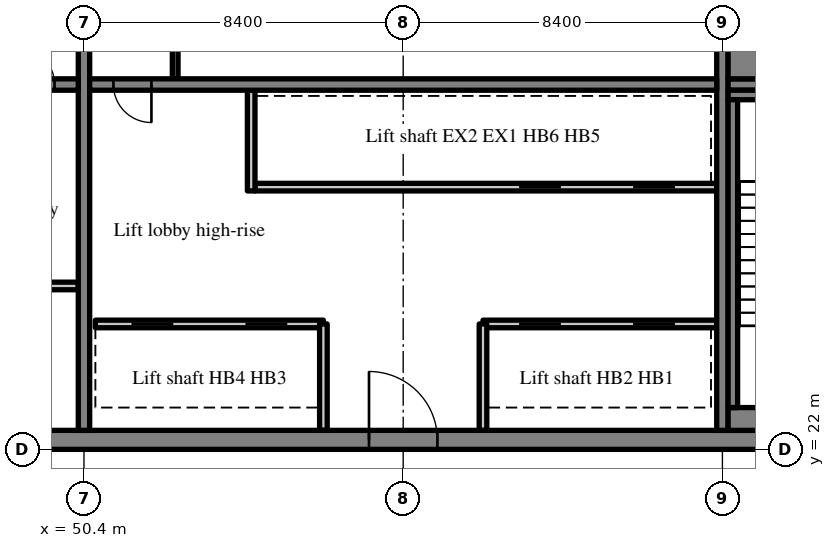
"""IFC4 building model, lengths in metres.
Left out: names, types, materials, properties, quantities, classifications, styles, units other than length and angle.
Written with IfcOpenShell. Run it as: python <this file> out.ifc"""

import sys

from ifc_helpers import new_model, si_unit, direction, frame, frame_2d, origin, place, context, subcontext, project, spatial, rectangle, extrude, source, transform, mapped, element, fill, save


model = new_model("IFC4")
c1 = context("Model", 3, precision=1e-05, world=origin(), true_north=direction((0.0, 1.0)))
c2 = subcontext(c1, "Body", "Model", "MODEL_VIEW")
j1 = project(units=[si_unit("LENGTHUNIT", "METRE"), si_unit("PLANEANGLEUNIT", "RADIAN")], contexts=[c1])
p1 = place(None, origin())
s1 = spatial("IfcSite", under=j1, at=p1, CompositionType="ELEMENT")
p2 = place(p1, origin())
s2 = spatial("IfcBuilding", under=s1, at=p2, CompositionType="ELEMENT")
p3 = place(p2, frame((0.0, 0.0, 301.7)))
s3 = spatial("IfcBuildingStorey", under=s2, at=p3, CompositionType="ELEMENT", Elevation=301.7)
m1 = source(origin(), c2, "Body", "SweptSolid", [
    extrude(rectangle(XDim=50.4, YDim=0.5, at=frame_2d((25.2, 0.0))), origin(), (0.0, 0.0, 1.0), 3.72),
])
p4 = place(p3, frame((25.2, 22.25, 0.0), z_axis=(0.0, 0.0, 1.0), x_axis=(1.0, 0.0, 0.0)))
e1 = element("IfcWall", 1, at=p4, inside=s3, PredefinedType="SHEAR", context=c2, shape_type="MappedRepresentation", body=[
    mapped(m1, transform((0.0, 0.0, 0.0), scale=1.0)),
])
m2 = source(origin(), c2, "Body", "SweptSolid", [
    extrude(rectangle(XDim=1.8, YDim=2.1, at=frame_2d((0.9, 1.05))), frame((0.0, 0.26, 0.0), z_axis=(0.0, -1.0, 0.0), x_axis=(1.0, 0.0, 0.0)), (0.0, 0.0, 1.0), 0.52),
])
p5 = place(p4, frame((15.9, 0.0, 0.0)))
e2 = element("IfcOpeningElement", 2, at=p5, cuts=e1, PredefinedType="OPENING", context=c2, shape_type="MappedRepresentation", body=[
    mapped(m2, transform((0.0, 0.0, 0.0), scale=1.0)),
])
m3 = source(origin(), c2, "Body", "SweptSolid", [
    extrude(rectangle(XDim=0.9, YDim=2.1, at=frame_2d((0.45, 1.05))), frame((0.0, 0.26, 0.0), z_axis=(0.0, -1.0, 0.0), x_axis=(1.0, 0.0, 0.0)), (0.0, 0.0, 1.0), 0.52),
])
p6 = place(p4, frame((11.175, 0.0, 0.0)))
e3 = element("IfcOpeningElement", 3, at=p6, cuts=e1, PredefinedType="OPENING", context=c2, shape_type="MappedRepresentation", body=[
    mapped(m3, transform((0.0, 0.0, 0.0), scale=1.0)),
])
p7 = place(p4, frame((21.525, 0.0, 0.0)))
e4 = element("IfcOpeningElement", 4, at=p7, cuts=e1, PredefinedType="OPENING", context=c2, shape_type="MappedRepresentation", body=[
    mapped(m3, transform((0.0, 0.0, 0.0), scale=1.0)),
])
p8 = place(p4, frame((32.7, 0.0, 0.0)))
e5 = element("IfcOpeningElement", 5, at=p8, cuts=e1, PredefinedType="OPENING", context=c2, shape_type="MappedRepresentation", body=[
    mapped(m2, transform((0.0, 0.0, 0.0), scale=1.0)),
])
m4 = source(origin(), c2, "Body", "SweptSolid", [
    extrude(rectangle(XDim=1.2, YDim=2.1, at=frame_2d((0.6, 1.05))), frame((0.0, 0.26, 0.0), z_axis=(0.0, -1.0, 0.0), x_axis=(1.0, 0.0, 0.0)), (0.0, 0.0, 1.0), 0.52),
])
p9 = place(p4, frame((6.5, 0.0, 0.0)))
e6 = element("IfcOpeningElement", 6, at=p9, cuts=e1, PredefinedType="OPENING", context=c2, shape_type="MappedRepresentation", body=[
    mapped(m4, transform((0.0, 0.0, 0.0), scale=1.0)),
])
p10 = place(p4, frame((47.975, 0.0, 0.0)))
e7 = element("IfcOpeningElement", 7, at=p10, cuts=e1, PredefinedType="OPENING", context=c2, shape_type="MappedRepresentation", body=[
    mapped(m4, transform((0.0, 0.0, 0.0), scale=1.0)),
])
m5 = source(origin(), c2, "Body", "SweptSolid", [
    extrude(rectangle(XDim=19.0, YDim=0.3, at=frame_2d((9.5, 0.0))), origin(), (0.0, 0.0, 1.0), 3.72),
])
p11 = place(p3, frame((50.4, 22.5, 0.0), z_axis=(0.0, 0.0, 1.0), x_axis=(0.0, 1.0, 0.0)))
e8 = element("IfcWall", 8, at=p11, inside=s3, PredefinedType="SHEAR", context=c2, shape_type="MappedRepresentation", body=[
    mapped(m5, transform((0.0, 0.0, 0.0), scale=1.0)),
])
m6 = source(origin(), c2, "Body", "SweptSolid", [
    extrude(rectangle(XDim=1.1, YDim=2.1, at=frame_2d((0.55, 1.05))), frame((0.0, 0.16, 0.0), z_axis=(0.0, -1.0, 0.0), x_axis=(1.0, 0.0, 0.0)), (0.0, 0.0, 1.0), 0.32),
])
p12 = place(p11, frame((12.95, 0.0, 0.0)))
e9 = element("IfcOpeningElement", 9, at=p12, cuts=e8, PredefinedType="OPENING", context=c2, shape_type="MappedRepresentation", body=[
    mapped(m6, transform((0.0, 0.0, 0.0), scale=1.0)),
])
p13 = place(p3, frame((67.2, 22.5, 0.0), z_axis=(0.0, 0.0, 1.0), x_axis=(0.0, 1.0, 0.0)))
e10 = element("IfcWall", 10, at=p13, inside=s3, PredefinedType="SHEAR", context=c2, shape_type="MappedRepresentation", body=[
    mapped(m5, transform((0.0, 0.0, 0.0), scale=1.0)),
])
m7 = source(origin(), c2, "Body", "SweptSolid", [
    extrude(rectangle(XDim=16.5, YDim=0.3, at=frame_2d((8.25, 0.0))), origin(), (0.0, 0.0, 1.0), 3.72),
])
p14 = place(p3, frame((33.75, 31.6, 0.0), z_axis=(0.0, 0.0, 1.0), x_axis=(1.0, 0.0, 0.0)))
e11 = element("IfcWall", 11, at=p14, inside=s3, PredefinedType="SHEAR", context=c2, shape_type="MappedRepresentation", body=[
    mapped(m7, transform((0.0, 0.0, 0.0), scale=1.0)),
])
m8 = source(origin(), c2, "Body", "SweptSolid", [
    extrude(rectangle(XDim=1.0, YDim=2.1, at=frame_2d((0.5, 1.05))), frame((0.0, 0.16, 0.0), z_axis=(0.0, -1.0, 0.0), x_axis=(1.0, 0.0, 0.0)), (0.0, 0.0, 1.0), 0.32),
])
p15 = place(p14, frame((14.875, 0.0, 0.0)))
e12 = element("IfcOpeningElement", 12, at=p15, cuts=e11, PredefinedType="OPENING", context=c2, shape_type="MappedRepresentation", body=[
    mapped(m8, transform((0.0, 0.0, 0.0), scale=1.0)),
])
p16 = place(p3, frame((50.55, 31.6, 0.0), z_axis=(0.0, 0.0, 1.0), x_axis=(1.0, 0.0, 0.0)))
e13 = element("IfcWall", 13, at=p16, inside=s3, PredefinedType="SHEAR", context=c2, shape_type="MappedRepresentation", body=[
    mapped(m7, transform((0.0, 0.0, 0.0), scale=1.0)),
])
p17 = place(p16, frame((0.625, 0.0, 0.0)))
e14 = element("IfcOpeningElement", 14, at=p17, cuts=e13, PredefinedType="OPENING", context=c2, shape_type="MappedRepresentation", body=[
    mapped(m8, transform((0.0, 0.0, 0.0), scale=1.0)),
])
m9 = source(origin(), c2, "Body", "SweptSolid", [
    extrude(rectangle(XDim=7.75, YDim=0.3, at=frame_2d((3.875, 0.0))), origin(), (0.0, 0.0, 1.0), 3.72),
])
p18 = place(p3, frame((67.35, 31.6, 0.0), z_axis=(0.0, 0.0, 1.0), x_axis=(1.0, 0.0, 0.0)))
e15 = element("IfcWall", 15, at=p18, inside=s3, PredefinedType="SHEAR", context=c2, shape_type="MappedRepresentation", body=[
    mapped(m9, transform((0.0, 0.0, 0.0), scale=1.0)),
])
p19 = place(p18, frame((5.875, 0.0, 0.0)))
e16 = element("IfcOpeningElement", 16, at=p19, cuts=e15, PredefinedType="OPENING", context=c2, shape_type="MappedRepresentation", body=[
    mapped(m6, transform((0.0, 0.0, 0.0), scale=1.0)),
])
m10 = source(origin(), c2, "Body", "SweptSolid", [
    extrude(rectangle(XDim=6.15, YDim=0.2, at=frame_2d((3.075, 0.0))), origin(), (0.0, 0.0, 1.0), 3.72),
])
p20 = place(p3, frame((44.1, 26.3, 0.0), z_axis=(0.0, 0.0, 1.0), x_axis=(1.0, 0.0, 0.0)))
e17 = element("IfcWall", 17, at=p20, inside=s3, PredefinedType="PARTITIONING", context=c2, shape_type="MappedRepresentation", body=[
    mapped(m10, transform((0.0, 0.0, 0.0), scale=1.0)),
])
m11 = source(origin(), c2, "Body", "SweptSolid", [
    extrude(rectangle(XDim=6.15, YDim=0.2, at=frame_2d((3.075, 0.0))), origin(), (0.0, 0.0, 1.0), 3.72),
])
p21 = place(p3, frame((67.05, 25.3, 0.0), z_axis=(0.0, 0.0, 1.0), x_axis=(-1.0, 0.0, 0.0)))
e18 = element("IfcWall", 18, at=p21, inside=s3, PredefinedType="SOLIDWALL", context=c2, shape_type="MappedRepresentation", body=[
    mapped(m11, transform((0.0, 0.0, 0.0), scale=1.0)),
])
m12 = source(origin(), c2, "Body", "SweptSolid", [
    extrude(rectangle(XDim=1.1, YDim=2.1, at=frame_2d((0.55, 1.05))), frame((0.0, 0.11, 0.0), z_axis=(0.0, -1.0, 0.0), x_axis=(1.0, 0.0, 0.0)), (0.0, 0.0, 1.0), 0.22),
])
p22 = place(p21, frame((1.1, 0.0, 0.0)))
e19 = element("IfcOpeningElement", 19, at=p22, cuts=e18, PredefinedType="OPENING", context=c2, shape_type="MappedRepresentation", body=[
    mapped(m12, transform((0.0, 0.0, 0.0), scale=1.0)),
])
p23 = place(p21, frame((4.1, 0.0, 0.0)))
e20 = element("IfcOpeningElement", 20, at=p23, cuts=e18, PredefinedType="OPENING", context=c2, shape_type="MappedRepresentation", body=[
    mapped(m12, transform((0.0, 0.0, 0.0), scale=1.0)),
])
m13 = source(origin(), c2, "Body", "SweptSolid", [
    extrude(rectangle(XDim=6.0, YDim=0.2, at=frame_2d((3.0, 0.0))), origin(), (0.0, 0.0, 1.0), 3.72),
])
p24 = place(p3, frame((56.7, 25.3, 0.0), z_axis=(0.0, 0.0, 1.0), x_axis=(-1.0, 0.0, 0.0)))
e21 = element("IfcWall", 21, at=p24, inside=s3, PredefinedType="SOLIDWALL", context=c2, shape_type="MappedRepresentation", body=[
    mapped(m13, transform((0.0, 0.0, 0.0), scale=1.0)),
])
p25 = place(p24, frame((0.95, 0.0, 0.0)))
e22 = element("IfcOpeningElement", 22, at=p25, cuts=e21, PredefinedType="OPENING", context=c2, shape_type="MappedRepresentation", body=[
    mapped(m12, transform((0.0, 0.0, 0.0), scale=1.0)),
])
p26 = place(p24, frame((3.95, 0.0, 0.0)))
e23 = element("IfcOpeningElement", 23, at=p26, cuts=e21, PredefinedType="OPENING", context=c2, shape_type="MappedRepresentation", body=[
    mapped(m12, transform((0.0, 0.0, 0.0), scale=1.0)),
])
m14 = source(origin(), c2, "Body", "SweptSolid", [
    extrude(rectangle(XDim=12.15, YDim=0.2, at=frame_2d((6.075, 0.0))), origin(), (0.0, 0.0, 1.0), 3.72),
])
p27 = place(p3, frame((67.05, 28.9, 0.0), z_axis=(0.0, 0.0, 1.0), x_axis=(-1.0, 0.0, 0.0)))
e24 = element("IfcWall", 24, at=p27, inside=s3, PredefinedType="SOLIDWALL", context=c2, shape_type="MappedRepresentation", body=[
    mapped(m14, transform((0.0, 0.0, 0.0), scale=1.0)),
])
p28 = place(p27, frame((1.1, 0.0, 0.0)))
e25 = element("IfcOpeningElement", 25, at=p28, cuts=e24, PredefinedType="OPENING", context=c2, shape_type="MappedRepresentation", body=[
    mapped(m12, transform((0.0, 0.0, 0.0), scale=1.0)),
])
p29 = place(p27, frame((4.1, 0.0, 0.0)))
e26 = element("IfcOpeningElement", 26, at=p29, cuts=e24, PredefinedType="OPENING", context=c2, shape_type="MappedRepresentation", body=[
    mapped(m12, transform((0.0, 0.0, 0.0), scale=1.0)),
])
m15 = source(origin(), c2, "Body", "SweptSolid", [
    extrude(rectangle(XDim=2.8, YDim=0.2, at=frame_2d((1.4, 0.0))), origin(), (0.0, 0.0, 1.0), 3.72),
])
for number, where, z_axis, x_axis in (
    (27, (60.9, 22.5, 0.0), (0.0, 0.0, 1.0), (0.0, 1.0, 0.0)),
    (28, (56.7, 22.5, 0.0), (0.0, 0.0, 1.0), (0.0, 1.0, 0.0)),
):
    element("IfcWall", number, at=place(p3, frame(where, z_axis=z_axis, x_axis=x_axis)), inside=s3, PredefinedType="SOLIDWALL", context=c2, shape_type="MappedRepresentation", body=[
        mapped(m15, transform((0.0, 0.0, 0.0), scale=1.0)),
    ])
m16 = source(origin(), c2, "Body", "SweptSolid", [
    extrude(rectangle(XDim=2.65, YDim=0.2, at=frame_2d((1.325, 0.0))), origin(), (0.0, 0.0, 1.0), 3.72),
])
p30 = place(p3, frame((54.8, 28.8, 0.0), z_axis=(0.0, 0.0, 1.0), x_axis=(0.0, 1.0, 0.0)))
e29 = element("IfcWall", 29, at=p30, inside=s3, PredefinedType="SOLIDWALL", context=c2, shape_type="MappedRepresentation", body=[
    mapped(m16, transform((0.0, 0.0, 0.0), scale=1.0)),
])
m17 = source(origin(), c2, "Body", "SweptSolid", [
    extrude(rectangle(XDim=3.25, YDim=0.15, at=frame_2d((1.625, 0.0))), origin(), (0.0, 0.0, 1.0), 3.72),
])
p31 = place(p3, frame((52.8, 31.75, 0.0), z_axis=(0.0, 0.0, 1.0), x_axis=(0.0, 1.0, 0.0)))
e30 = element("IfcWall", 30, at=p31, inside=s3, PredefinedType="PARTITIONING", context=c2, shape_type="MappedRepresentation", body=[
    mapped(m17, transform((0.0, 0.0, 0.0), scale=1.0)),
])
m18 = source(origin(), c2, "Body", "SweptSolid", [
    extrude(rectangle(XDim=4.9, YDim=0.6, at=frame_2d((2.45, 0.0))), origin(), (0.0, 0.0, 1.0), 3.72),
])
p32 = place(p3, frame((67.35, 22.8, 0.0), z_axis=(0.0, 0.0, 1.0), x_axis=(1.0, 0.0, 0.0)))
e31 = element("IfcWall", 31, at=p32, inside=s3, PredefinedType="SOLIDWALL", context=c2, shape_type="MappedRepresentation", body=[
    mapped(m18, transform((0.0, 0.0, 0.0), scale=1.0)),
])
m19 = source(origin(), c2, "Body", "SweptSolid", [
    extrude(rectangle(XDim=4.9, YDim=0.25, at=frame_2d((2.45, 0.0))), origin(), (0.0, 0.0, 1.0), 3.72),
])
p33 = place(p3, frame((67.35, 31.325, 0.0), z_axis=(0.0, 0.0, 1.0), x_axis=(1.0, 0.0, 0.0)))
e32 = element("IfcWall", 32, at=p33, inside=s3, PredefinedType="SOLIDWALL", context=c2, shape_type="MappedRepresentation", body=[
    mapped(m19, transform((0.0, 0.0, 0.0), scale=1.0)),
])
m20 = source(origin(), c2, "Body", "SweptSolid", [
    extrude(rectangle(XDim=8.1, YDim=0.25, at=frame_2d((4.05, 0.0))), origin(), (0.0, 0.0, 1.0), 3.72),
])
p34 = place(p3, frame((67.475, 23.1, 0.0), z_axis=(0.0, 0.0, 1.0), x_axis=(0.0, 1.0, 0.0)))
e33 = element("IfcWall", 33, at=p34, inside=s3, PredefinedType="SOLIDWALL", context=c2, shape_type="MappedRepresentation", body=[
    mapped(m20, transform((0.0, 0.0, 0.0), scale=1.0)),
])
m21 = source(origin(), c2, "Body", "SweptSolid", [
    extrude(rectangle(XDim=4.9, YDim=1.05, at=frame_2d((2.45, 0.0))), origin(), (0.0, 0.0, 1.0), 3.72),
])
p35 = place(p3, frame((67.35, 32.275, 0.0), z_axis=(0.0, 0.0, 1.0), x_axis=(1.0, 0.0, 0.0)))
e34 = element("IfcWall", 34, at=p35, inside=s3, PredefinedType="SOLIDWALL", context=c2, shape_type="MappedRepresentation", body=[
    mapped(m21, transform((0.0, 0.0, 0.0), scale=1.0)),
])
m22 = source(origin(), c2, "Body", "SweptSolid", [
    extrude(rectangle(XDim=1.0, YDim=2.1, at=frame_2d((0.5, 1.05))), frame((0.0, 0.025, 0.0), z_axis=(0.0, -1.0, 0.0), x_axis=(1.0, 0.0, 0.0)), (0.0, 0.0, 1.0), 0.05),
])
p36 = place(p15, origin())
e35 = element("IfcDoor", 35, at=p36, inside=s3, OperationType="SINGLE_SWING_LEFT", PredefinedType="DOOR", context=c2, shape_type="MappedRepresentation", body=[
    mapped(m22, transform((0.0, 0.0, 0.0), scale=1.0)),
])
fill(e12, e35)
m23 = source(origin(), c2, "Body", "SweptSolid", [
    extrude(rectangle(XDim=1.8, YDim=2.1, at=frame_2d((0.9, 1.05))), frame((0.0, 0.175, 0.0), z_axis=(0.0, -1.0, 0.0), x_axis=(1.0, 0.0, 0.0)), (0.0, 0.0, 1.0), 0.05),
])
p37 = place(p8, origin())
e36 = element("IfcDoor", 36, at=p37, inside=s3, OperationType="DOUBLE_DOOR_SINGLE_SWING", PredefinedType="DOOR", context=c2, shape_type="MappedRepresentation", body=[
    mapped(m23, transform((0.0, 0.0, 0.0), scale=1.0)),
])
fill(e5, e36)
p38 = place(p17, origin())
e37 = element("IfcDoor", 37, at=p38, inside=s3, OperationType="SINGLE_SWING_RIGHT", PredefinedType="DOOR", context=c2, shape_type="MappedRepresentation", body=[
    mapped(m22, transform((0.0, 0.0, 0.0), scale=1.0)),
])
fill(e14, e37)
m24 = source(origin(), c2, "Body", "SweptSolid", [
    extrude(rectangle(XDim=1.1, YDim=2.1, at=frame_2d((0.55, 1.05))), frame((0.0, 0.025, 0.0), z_axis=(0.0, -1.0, 0.0), x_axis=(1.0, 0.0, 0.0)), (0.0, 0.0, 1.0), 0.05),
])
p39 = place(p22, origin())
e38 = element("IfcDoor", 38, at=p39, inside=s3, OperationType="SLIDING_TO_RIGHT", PredefinedType="DOOR", context=c2, shape_type="MappedRepresentation", body=[
    mapped(m24, transform((0.0, 0.0, 0.0), scale=1.0)),
])
fill(e19, e38)
p40 = place(p23, origin())
e39 = element("IfcDoor", 39, at=p40, inside=s3, OperationType="SLIDING_TO_LEFT", PredefinedType="DOOR", context=c2, shape_type="MappedRepresentation", body=[
    mapped(m24, transform((0.0, 0.0, 0.0), scale=1.0)),
])
fill(e20, e39)
p41 = place(p25, origin())
e40 = element("IfcDoor", 40, at=p41, inside=s3, OperationType="SLIDING_TO_RIGHT", PredefinedType="DOOR", context=c2, shape_type="MappedRepresentation", body=[
    mapped(m24, transform((0.0, 0.0, 0.0), scale=1.0)),
])
fill(e22, e40)
p42 = place(p26, origin())
e41 = element("IfcDoor", 41, at=p42, inside=s3, OperationType="SLIDING_TO_LEFT", PredefinedType="DOOR", context=c2, shape_type="MappedRepresentation", body=[
    mapped(m24, transform((0.0, 0.0, 0.0), scale=1.0)),
])
fill(e23, e41)
p43 = place(p28, origin())
e42 = element("IfcDoor", 42, at=p43, inside=s3, OperationType="SLIDING_TO_RIGHT", PredefinedType="DOOR", context=c2, shape_type="MappedRepresentation", body=[
    mapped(m24, transform((0.0, 0.0, 0.0), scale=1.0)),
])
fill(e25, e42)
p44 = place(p29, origin())
e43 = element("IfcDoor", 43, at=p44, inside=s3, OperationType="SLIDING_TO_LEFT", PredefinedType="DOOR", context=c2, shape_type="MappedRepresentation", body=[
    mapped(m24, transform((0.0, 0.0, 0.0), scale=1.0)),
])
fill(e26, e43)
save(model, sys.argv[1])
